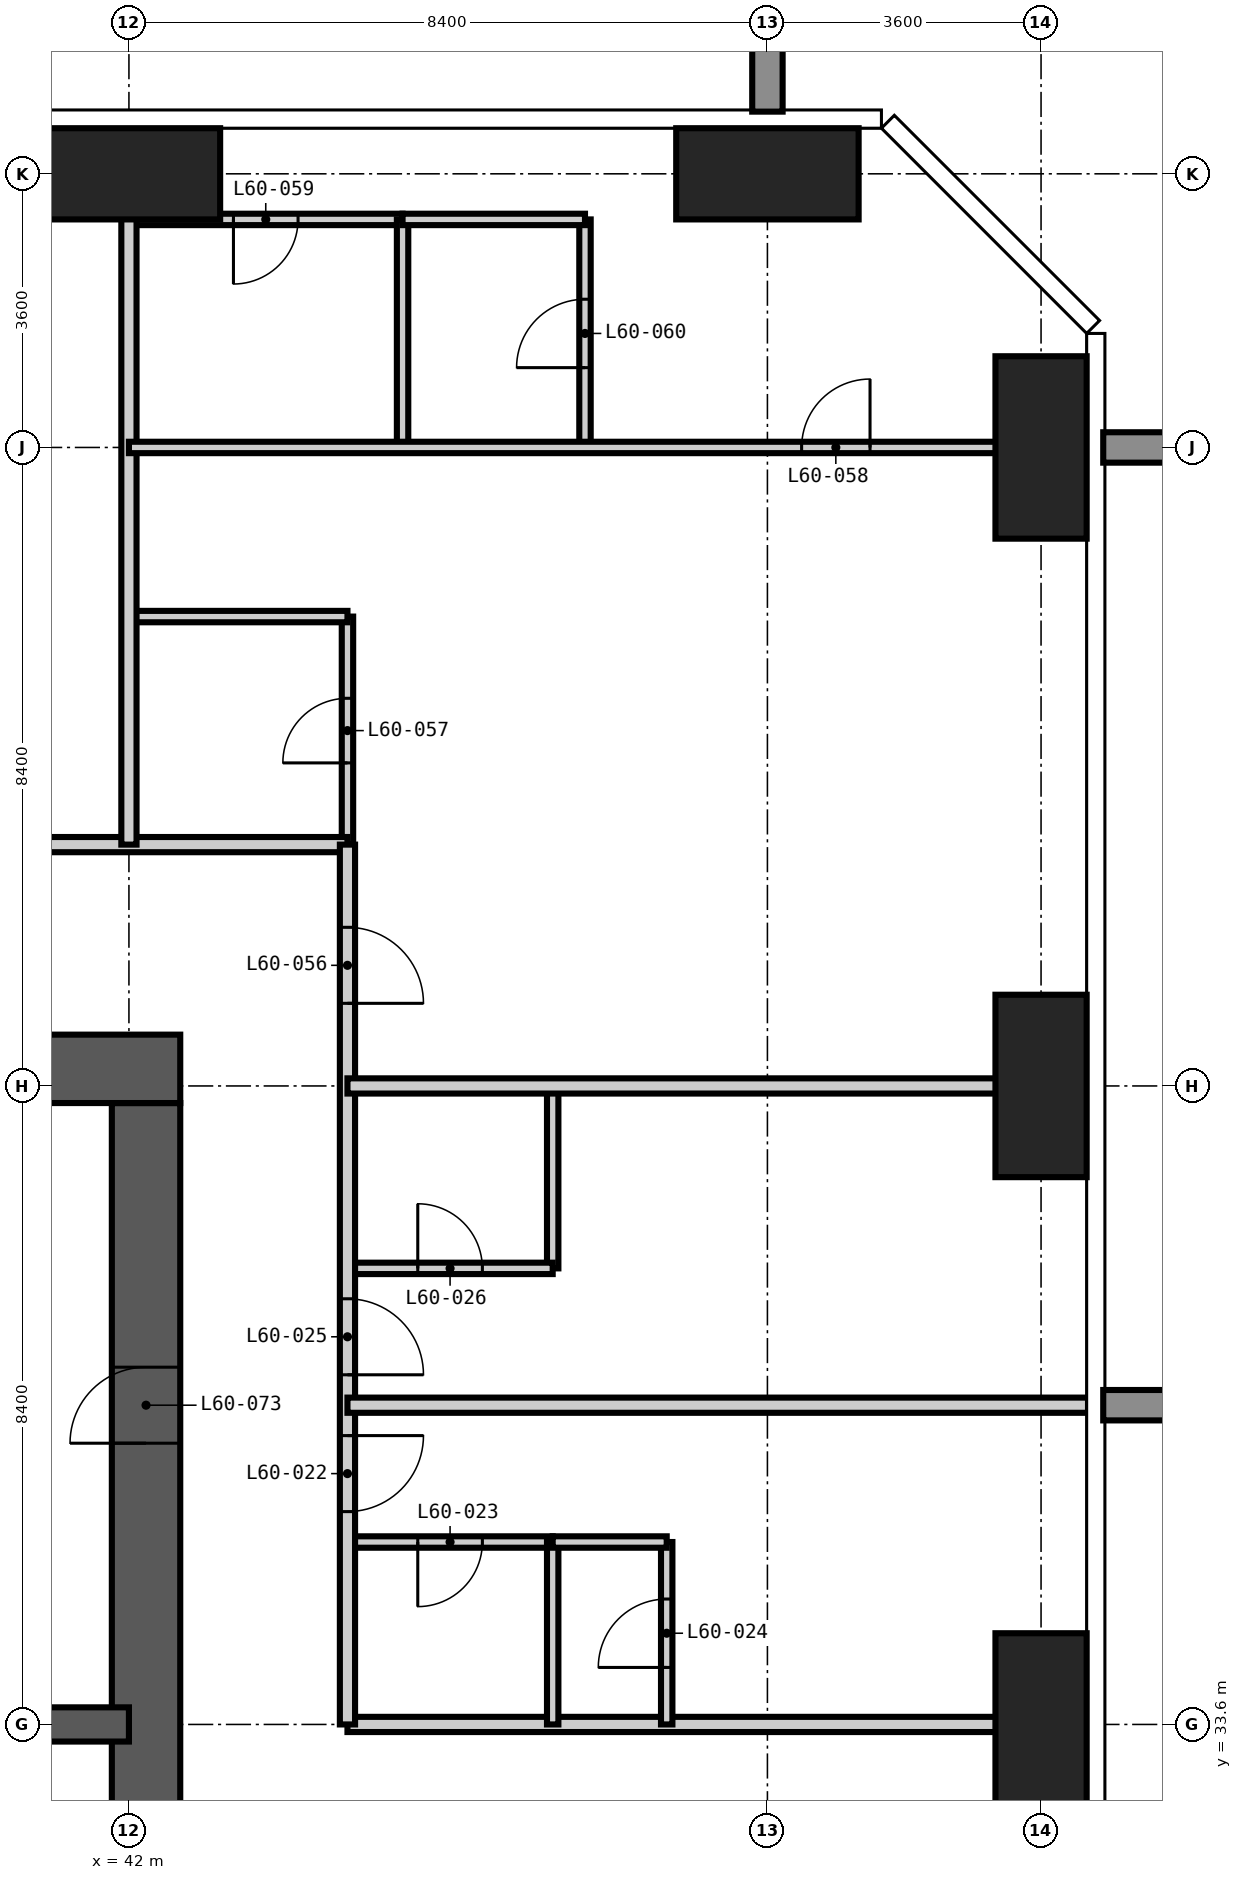
"""IFC4 building model, lengths in metres.
Left out: names, types, materials, properties, quantities, classifications, styles, units other than length and angle.
Written with IfcOpenShell. Run it as: python <this file> out.ifc"""

import sys

from ifc_helpers import new_model, si_unit, direction, frame, frame_2d, origin, origin_2d, place, context, subcontext, project, spatial, rectangle, extrude, element, fill, save


model = new_model("IFC4")
c1 = context("Model", 3, precision=1e-05, world=origin(), true_north=direction((0.0, 1.0)))
c2 = subcontext(c1, "Body", "Model", "MODEL_VIEW")
j1 = project(units=[si_unit("LENGTHUNIT", "METRE"), si_unit("PLANEANGLEUNIT", "RADIAN")], contexts=[c1])
p1 = place(None, origin())
s1 = spatial("IfcSite", under=j1, at=p1, CompositionType="ELEMENT")
p2 = place(p1, origin())
s2 = spatial("IfcBuilding", under=s1, at=p2, CompositionType="ELEMENT")
p3 = place(p2, frame((0.0, 0.0, 233.4)))
s3 = spatial("IfcBuildingStorey", under=s2, at=p3, CompositionType="ELEMENT", Elevation=233.4)
for number, where, z_axis, x_axis in (
    (1, (42.0, 54.0, -0.35), (0.0, 0.0, 1.0), (1.0, 0.0, 0.0)),
    (2, (50.4, 54.0, -0.35), (0.0, 0.0, 1.0), (1.0, 0.0, 0.0)),
):
    element("IfcColumn", number, at=place(p3, frame(where, z_axis=z_axis, x_axis=x_axis)), inside=s3, PredefinedType="COLUMN", context=c2, shape_type="SweptSolid", body=[
        extrude(rectangle(XDim=2.4, YDim=1.2, at=origin_2d()), origin(), (0.0, 0.0, 1.0), 3.9),
    ])
for number, where, z_axis, x_axis in (
    (3, (54.0, 33.6, -0.35), (0.0, 0.0, 1.0), (1.0, 0.0, 0.0)),
    (4, (54.0, 42.0, -0.35), (0.0, 0.0, 1.0), (1.0, 0.0, 0.0)),
    (5, (54.0, 50.4, -0.35), (0.0, 0.0, 1.0), (1.0, 0.0, 0.0)),
):
    element("IfcColumn", number, at=place(p3, frame(where, z_axis=z_axis, x_axis=x_axis)), inside=s3, PredefinedType="COLUMN", context=c2, shape_type="SweptSolid", body=[
        extrude(rectangle(XDim=1.2, YDim=2.4, at=origin_2d()), origin(), (0.0, 0.0, 1.0), 3.9),
    ])
p4 = place(p3, frame((42.225, 17.025, -0.35), z_axis=(0.0, 0.0, 1.0), x_axis=(0.0, 1.0, 0.0)))
e6 = element("IfcWall", 6, at=p4, inside=s3, PredefinedType="SHEAR", context=c2, shape_type="SweptSolid", body=[
    extrude(rectangle(XDim=24.75, YDim=0.9, at=frame_2d((12.375, 0.0))), origin(), (0.0, 0.0, 1.0), 3.9),
])
p5 = place(p4, frame((0.575, 0.0, 0.35)))
e7 = element("IfcOpeningElement", 7, at=p5, cuts=e6, PredefinedType="OPENING", context=c2, shape_type="SweptSolid", body=[
    extrude(rectangle(XDim=1.2, YDim=2.2, at=frame_2d((0.6, 1.1))), frame((0.0, 0.46, 0.0), z_axis=(0.0, -1.0, 0.0), x_axis=(1.0, 0.0, 0.0)), (0.0, 0.0, 1.0), 0.92),
])
p6 = place(p4, frame((11.475, 0.0, 0.35)))
e8 = element("IfcOpeningElement", 8, at=p6, cuts=e6, PredefinedType="OPENING", context=c2, shape_type="SweptSolid", body=[
    extrude(rectangle(XDim=1.8, YDim=2.2, at=frame_2d((0.9, 1.1))), frame((0.0, 0.46, 0.0), z_axis=(0.0, -1.0, 0.0), x_axis=(1.0, 0.0, 0.0)), (0.0, 0.0, 1.0), 0.92),
])
p7 = place(p4, frame((20.275, 0.0, 0.35)))
e9 = element("IfcOpeningElement", 9, at=p7, cuts=e6, PredefinedType="OPENING", context=c2, shape_type="SweptSolid", body=[
    extrude(rectangle(XDim=1.0, YDim=2.1, at=frame_2d((0.5, 1.05))), frame((0.0, 0.46, 0.0), z_axis=(0.0, -1.0, 0.0), x_axis=(1.0, 0.0, 0.0)), (0.0, 0.0, 1.0), 0.92),
])
p8 = place(p3, frame((42.675, 42.225, -0.35), z_axis=(0.0, 0.0, 1.0), x_axis=(-1.0, 0.0, 0.0)))
e10 = element("IfcWall", 10, at=p8, inside=s3, PredefinedType="SHEAR", context=c2, shape_type="SweptSolid", body=[
    extrude(rectangle(XDim=18.15, YDim=0.9, at=frame_2d((9.075, 0.0))), origin(), (0.0, 0.0, 1.0), 3.9),
])
p9 = place(p8, frame((10.575, 0.0, 0.35)))
e11 = element("IfcOpeningElement", 11, at=p9, cuts=e10, PredefinedType="OPENING", context=c2, shape_type="SweptSolid", body=[
    extrude(rectangle(XDim=1.2, YDim=2.2, at=frame_2d((0.6, 1.1))), frame((0.0, 0.46, 0.0), z_axis=(0.0, -1.0, 0.0), x_axis=(1.0, 0.0, 0.0)), (0.0, 0.0, 1.0), 0.92),
])
p10 = place(p3, frame((25.2, 33.6, -0.35), z_axis=(0.0, 0.0, 1.0), x_axis=(1.0, 0.0, 0.0)))
e12 = element("IfcWall", 12, at=p10, inside=s3, PredefinedType="SHEAR", context=c2, shape_type="SweptSolid", body=[
    extrude(rectangle(XDim=16.8, YDim=0.45, at=frame_2d((8.4, 0.0))), origin(), (0.0, 0.0, 1.0), 3.9),
])
p11 = place(p3, frame((44.875, 45.175, 0.0), z_axis=(0.0, 0.0, 1.0), x_axis=(0.0, 1.0, 0.0)))
e13 = element("IfcWall", 13, at=p11, inside=s3, PredefinedType="PARTITIONING", context=c2, shape_type="SweptSolid", body=[
    extrude(rectangle(XDim=3.0, YDim=0.15, at=frame_2d((1.5, 0.0))), origin(), (0.0, 0.0, 1.0), 3.55),
])
p12 = place(p11, frame((1.075, 0.0, 0.0)))
e14 = element("IfcOpeningElement", 14, at=p12, cuts=e13, PredefinedType="OPENING", context=c2, shape_type="SweptSolid", body=[
    extrude(rectangle(XDim=0.85, YDim=2.1, at=frame_2d((0.425, 1.05))), frame((0.0, 0.085, 0.0), z_axis=(0.0, -1.0, 0.0), x_axis=(1.0, 0.0, 0.0)), (0.0, 0.0, 1.0), 0.17),
])
p13 = place(p3, frame((47.575, 39.6, 0.0), z_axis=(0.0, 0.0, 1.0), x_axis=(0.0, 1.0, 0.0)))
e15 = element("IfcWall", 15, at=p13, inside=s3, PredefinedType="PARTITIONING", context=c2, shape_type="SweptSolid", body=[
    extrude(rectangle(XDim=2.4, YDim=0.15, at=frame_2d((1.2, 0.0))), origin(), (0.0, 0.0, 1.0), 3.55),
])
p14 = place(p3, frame((44.875, 36.0, 0.0), z_axis=(0.0, 0.0, 1.0), x_axis=(1.0, 0.0, 0.0)))
e16 = element("IfcWall", 16, at=p14, inside=s3, PredefinedType="PARTITIONING", context=c2, shape_type="SweptSolid", body=[
    extrude(rectangle(XDim=2.7, YDim=0.15, at=frame_2d((1.35, 0.0))), origin(), (0.0, 0.0, 1.0), 3.55),
])
p15 = place(p14, frame((0.925, 0.0, 0.0)))
e17 = element("IfcOpeningElement", 17, at=p15, cuts=e16, PredefinedType="OPENING", context=c2, shape_type="SweptSolid", body=[
    extrude(rectangle(XDim=0.85, YDim=2.1, at=frame_2d((0.425, 1.05))), frame((0.0, 0.085, 0.0), z_axis=(0.0, -1.0, 0.0), x_axis=(1.0, 0.0, 0.0)), (0.0, 0.0, 1.0), 0.17),
])
p16 = place(p3, frame((44.875, 39.6, 0.0), z_axis=(0.0, 0.0, 1.0), x_axis=(1.0, 0.0, 0.0)))
e18 = element("IfcWall", 18, at=p16, inside=s3, PredefinedType="PARTITIONING", context=c2, shape_type="SweptSolid", body=[
    extrude(rectangle(XDim=2.7, YDim=0.15, at=frame_2d((1.35, 0.0))), origin(), (0.0, 0.0, 1.0), 3.55),
])
p17 = place(p16, frame((0.925, 0.0, 0.0)))
e19 = element("IfcOpeningElement", 19, at=p17, cuts=e18, PredefinedType="OPENING", context=c2, shape_type="SweptSolid", body=[
    extrude(rectangle(XDim=0.85, YDim=2.1, at=frame_2d((0.425, 1.05))), frame((0.0, 0.085, 0.0), z_axis=(0.0, -1.0, 0.0), x_axis=(1.0, 0.0, 0.0)), (0.0, 0.0, 1.0), 0.17),
])
p18 = place(p3, frame((42.0, 48.175, 0.0), z_axis=(0.0, 0.0, 1.0), x_axis=(1.0, 0.0, 0.0)))
e20 = element("IfcWall", 20, at=p18, inside=s3, PredefinedType="PARTITIONING", context=c2, shape_type="SweptSolid", body=[
    extrude(rectangle(XDim=2.875, YDim=0.15, at=frame_2d((1.438, 0.0))), origin(), (0.0, 0.0, 1.0), 3.55),
])
p19 = place(p3, frame((42.0, 53.4, 0.0), z_axis=(0.0, 0.0, 1.0), x_axis=(1.0, 0.0, 0.0)))
e21 = element("IfcWall", 21, at=p19, inside=s3, PredefinedType="PARTITIONING", context=c2, shape_type="SweptSolid", body=[
    extrude(rectangle(XDim=3.6, YDim=0.15, at=frame_2d((1.8, 0.0))), origin(), (0.0, 0.0, 1.0), 3.55),
])
p20 = place(p19, frame((1.375, 0.0, 0.0)))
e22 = element("IfcOpeningElement", 22, at=p20, cuts=e21, PredefinedType="OPENING", context=c2, shape_type="SweptSolid", body=[
    extrude(rectangle(XDim=0.85, YDim=2.1, at=frame_2d((0.425, 1.05))), frame((0.0, 0.085, 0.0), z_axis=(0.0, -1.0, 0.0), x_axis=(1.0, 0.0, 0.0)), (0.0, 0.0, 1.0), 0.17),
])
p21 = place(p3, frame((44.875, 33.6, 0.0), z_axis=(0.0, 0.0, 1.0), x_axis=(1.0, 0.0, 0.0)))
e23 = element("IfcWall", 23, at=p21, inside=s3, PredefinedType="PARTITIONING", context=c2, shape_type="SweptSolid", body=[
    extrude(rectangle(XDim=9.743, YDim=0.2, at=frame_2d((4.872, 0.0))), origin(), (0.0, 0.0, 1.0), 3.55),
])
p22 = place(p3, frame((22.625, 45.175, 0.0), z_axis=(0.0, 0.0, 1.0), x_axis=(1.0, 0.0, 0.0)))
e24 = element("IfcWall", 24, at=p22, inside=s3, PredefinedType="PARTITIONING", context=c2, shape_type="SweptSolid", body=[
    extrude(rectangle(XDim=22.25, YDim=0.2, at=frame_2d((11.125, 0.0))), origin(), (0.0, 0.0, 1.0), 3.55),
])
p23 = place(p22, frame((7.625, 0.0, 0.0)))
e25 = element("IfcOpeningElement", 25, at=p23, cuts=e24, PredefinedType="OPENING", context=c2, shape_type="SweptSolid", body=[
    extrude(rectangle(XDim=1.0, YDim=2.2, at=frame_2d((0.5, 1.1))), frame((0.0, 0.11, 0.0), z_axis=(0.0, -1.0, 0.0), x_axis=(1.0, 0.0, 0.0)), (0.0, 0.0, 1.0), 0.22),
])
p24 = place(p22, frame((16.025, 0.0, 0.0)))
e26 = element("IfcOpeningElement", 26, at=p24, cuts=e24, PredefinedType="OPENING", context=c2, shape_type="SweptSolid", body=[
    extrude(rectangle(XDim=1.0, YDim=2.2, at=frame_2d((0.5, 1.1))), frame((0.0, 0.11, 0.0), z_axis=(0.0, -1.0, 0.0), x_axis=(1.0, 0.0, 0.0)), (0.0, 0.0, 1.0), 0.22),
])
p25 = place(p3, frame((44.875, 45.175, 0.0), z_axis=(0.0, 0.0, 1.0), x_axis=(0.0, -1.0, 0.0)))
e27 = element("IfcWall", 27, at=p25, inside=s3, PredefinedType="PARTITIONING", context=c2, shape_type="SweptSolid", body=[
    extrude(rectangle(XDim=11.575, YDim=0.2, at=frame_2d((5.788, 0.0))), origin(), (0.0, 0.0, 1.0), 3.55),
])
p26 = place(p25, frame((7.775, 0.0, 0.0)))
e28 = element("IfcOpeningElement", 28, at=p26, cuts=e27, PredefinedType="OPENING", context=c2, shape_type="SweptSolid", body=[
    extrude(rectangle(XDim=1.0, YDim=2.2, at=frame_2d((0.5, 1.1))), frame((0.0, 0.11, 0.0), z_axis=(0.0, -1.0, 0.0), x_axis=(1.0, 0.0, 0.0)), (0.0, 0.0, 1.0), 0.22),
])
p27 = place(p25, frame((5.975, 0.0, 0.0)))
e29 = element("IfcOpeningElement", 29, at=p27, cuts=e27, PredefinedType="OPENING", context=c2, shape_type="SweptSolid", body=[
    extrude(rectangle(XDim=1.0, YDim=2.2, at=frame_2d((0.5, 1.1))), frame((0.0, 0.11, 0.0), z_axis=(0.0, -1.0, 0.0), x_axis=(1.0, 0.0, 0.0)), (0.0, 0.0, 1.0), 0.22),
])
p28 = place(p25, frame((1.088, 0.0, 0.0)))
e30 = element("IfcOpeningElement", 30, at=p28, cuts=e27, PredefinedType="OPENING", context=c2, shape_type="SweptSolid", body=[
    extrude(rectangle(XDim=1.0, YDim=2.2, at=frame_2d((0.5, 1.1))), frame((0.0, 0.11, 0.0), z_axis=(0.0, -1.0, 0.0), x_axis=(1.0, 0.0, 0.0)), (0.0, 0.0, 1.0), 0.22),
])
p29 = place(p3, frame((42.0, 45.175, 0.0), z_axis=(0.0, 0.0, 1.0), x_axis=(0.0, 1.0, 0.0)))
e31 = element("IfcWall", 31, at=p29, inside=s3, PredefinedType="PARTITIONING", context=c2, shape_type="SweptSolid", body=[
    extrude(rectangle(XDim=9.443, YDim=0.2, at=frame_2d((4.721, 0.0))), origin(), (0.0, 0.0, 1.0), 3.55),
])
for number, where, z_axis, x_axis in (
    (32, (44.875, 37.8, 0.0), (0.0, 0.0, 1.0), (1.0, 0.0, 0.0)),
    (33, (44.875, 42.0, 0.0), (0.0, 0.0, 1.0), (1.0, 0.0, 0.0)),
):
    element("IfcWall", number, at=place(p3, frame(where, z_axis=z_axis, x_axis=x_axis)), inside=s3, PredefinedType="PARTITIONING", context=c2, shape_type="SweptSolid", body=[
        extrude(rectangle(XDim=9.743, YDim=0.2, at=frame_2d((4.872, 0.0))), origin(), (0.0, 0.0, 1.0), 3.55),
    ])
p30 = place(p3, frame((45.6, 50.4, 0.0), z_axis=(0.0, 0.0, 1.0), x_axis=(0.0, 1.0, 0.0)))
e34 = element("IfcWall", 34, at=p30, inside=s3, PredefinedType="PARTITIONING", context=c2, shape_type="SweptSolid", body=[
    extrude(rectangle(XDim=3.0, YDim=0.15, at=frame_2d((1.5, 0.0))), origin(), (0.0, 0.0, 1.0), 3.55),
])
p31 = place(p3, frame((47.575, 33.6, 0.0), z_axis=(0.0, 0.0, 1.0), x_axis=(0.0, 1.0, 0.0)))
e35 = element("IfcWall", 35, at=p31, inside=s3, PredefinedType="PARTITIONING", context=c2, shape_type="SweptSolid", body=[
    extrude(rectangle(XDim=2.4, YDim=0.15, at=frame_2d((1.2, 0.0))), origin(), (0.0, 0.0, 1.0), 3.55),
])
p32 = place(p3, frame((48.0, 50.4, 0.0), z_axis=(0.0, 0.0, 1.0), x_axis=(0.0, 1.0, 0.0)))
e36 = element("IfcWall", 36, at=p32, inside=s3, PredefinedType="PARTITIONING", context=c2, shape_type="SweptSolid", body=[
    extrude(rectangle(XDim=3.0, YDim=0.15, at=frame_2d((1.5, 0.0))), origin(), (0.0, 0.0, 1.0), 3.55),
])
p33 = place(p32, frame((1.05, 0.0, 0.0)))
e37 = element("IfcOpeningElement", 37, at=p33, cuts=e36, PredefinedType="OPENING", context=c2, shape_type="SweptSolid", body=[
    extrude(rectangle(XDim=0.9, YDim=2.1, at=frame_2d((0.45, 1.05))), frame((0.0, 0.085, 0.0), z_axis=(0.0, -1.0, 0.0), x_axis=(1.0, 0.0, 0.0)), (0.0, 0.0, 1.0), 0.17),
])
p34 = place(p3, frame((49.075, 33.6, 0.0), z_axis=(0.0, 0.0, 1.0), x_axis=(0.0, 1.0, 0.0)))
e38 = element("IfcWall", 38, at=p34, inside=s3, PredefinedType="PARTITIONING", context=c2, shape_type="SweptSolid", body=[
    extrude(rectangle(XDim=2.4, YDim=0.15, at=frame_2d((1.2, 0.0))), origin(), (0.0, 0.0, 1.0), 3.55),
])
p35 = place(p34, frame((0.75, 0.0, 0.0)))
e39 = element("IfcOpeningElement", 39, at=p35, cuts=e38, PredefinedType="OPENING", context=c2, shape_type="SweptSolid", body=[
    extrude(rectangle(XDim=0.9, YDim=2.1, at=frame_2d((0.45, 1.05))), frame((0.0, 0.085, 0.0), z_axis=(0.0, -1.0, 0.0), x_axis=(1.0, 0.0, 0.0)), (0.0, 0.0, 1.0), 0.17),
])
p36 = place(p3, frame((47.575, 36.0, 0.0), z_axis=(0.0, 0.0, 1.0), x_axis=(1.0, 0.0, 0.0)))
e40 = element("IfcWall", 40, at=p36, inside=s3, PredefinedType="PARTITIONING", context=c2, shape_type="SweptSolid", body=[
    extrude(rectangle(XDim=1.5, YDim=0.15, at=frame_2d((0.75, 0.0))), origin(), (0.0, 0.0, 1.0), 3.55),
])
p37 = place(p3, frame((42.0, 50.4, 0.0), z_axis=(0.0, 0.0, 1.0), x_axis=(1.0, 0.0, 0.0)))
e41 = element("IfcWall", 41, at=p37, inside=s3, PredefinedType="PARTITIONING", context=c2, shape_type="SweptSolid", body=[
    extrude(rectangle(XDim=12.618, YDim=0.15, at=frame_2d((6.309, 0.0))), origin(), (0.0, 0.0, 1.0), 3.55),
])
p38 = place(p37, frame((8.85, 0.0, 0.0)))
e42 = element("IfcOpeningElement", 42, at=p38, cuts=e41, PredefinedType="OPENING", context=c2, shape_type="SweptSolid", body=[
    extrude(rectangle(XDim=0.9, YDim=2.1, at=frame_2d((0.45, 1.05))), frame((0.0, 0.085, 0.0), z_axis=(0.0, -1.0, 0.0), x_axis=(1.0, 0.0, 0.0)), (0.0, 0.0, 1.0), 0.17),
])
p39 = place(p3, frame((45.6, 53.4, 0.0), z_axis=(0.0, 0.0, 1.0), x_axis=(1.0, 0.0, 0.0)))
e43 = element("IfcWall", 43, at=p39, inside=s3, PredefinedType="PARTITIONING", context=c2, shape_type="SweptSolid", body=[
    extrude(rectangle(XDim=2.4, YDim=0.15, at=frame_2d((1.2, 0.0))), origin(), (0.0, 0.0, 1.0), 3.55),
])
p40 = place(p26, origin())
e44 = element("IfcDoor", 44, at=p40, inside=s3, OperationType="SINGLE_SWING_LEFT", PredefinedType="DOOR", context=c2, shape_type="SweptSolid", body=[
    extrude(rectangle(XDim=1.0, YDim=2.2, at=frame_2d((0.5, 1.1))), frame((0.0, 0.025, 0.0), z_axis=(0.0, -1.0, 0.0), x_axis=(1.0, 0.0, 0.0)), (0.0, 0.0, 1.0), 0.05),
])
fill(e28, e44)
p41 = place(p15, frame((0.85, 0.0, 0.0), z_axis=(0.0, 0.0, 1.0), x_axis=(-1.0, 0.0, 0.0)))
e45 = element("IfcDoor", 45, at=p41, inside=s3, OperationType="SINGLE_SWING_RIGHT", PredefinedType="DOOR", context=c2, shape_type="SweptSolid", body=[
    extrude(rectangle(XDim=0.85, YDim=2.1, at=frame_2d((0.425, 1.05))), frame((0.0, 0.025, 0.0), z_axis=(0.0, -1.0, 0.0), x_axis=(1.0, 0.0, 0.0)), (0.0, 0.0, 1.0), 0.05),
])
fill(e17, e45)
p42 = place(p35, origin())
e46 = element("IfcDoor", 46, at=p42, inside=s3, OperationType="SINGLE_SWING_LEFT", PredefinedType="DOOR", context=c2, shape_type="SweptSolid", body=[
    extrude(rectangle(XDim=0.9, YDim=2.1, at=frame_2d((0.45, 1.05))), frame((0.0, 0.025, 0.0), z_axis=(0.0, -1.0, 0.0), x_axis=(1.0, 0.0, 0.0)), (0.0, 0.0, 1.0), 0.05),
])
fill(e39, e46)
p43 = place(p27, origin())
e47 = element("IfcDoor", 47, at=p43, inside=s3, OperationType="SINGLE_SWING_RIGHT", PredefinedType="DOOR", context=c2, shape_type="SweptSolid", body=[
    extrude(rectangle(XDim=1.0, YDim=2.2, at=frame_2d((0.5, 1.1))), frame((0.0, 0.025, 0.0), z_axis=(0.0, -1.0, 0.0), x_axis=(1.0, 0.0, 0.0)), (0.0, 0.0, 1.0), 0.05),
])
fill(e29, e47)
p44 = place(p17, origin())
e48 = element("IfcDoor", 48, at=p44, inside=s3, OperationType="SINGLE_SWING_LEFT", PredefinedType="DOOR", context=c2, shape_type="SweptSolid", body=[
    extrude(rectangle(XDim=0.85, YDim=2.1, at=frame_2d((0.425, 1.05))), frame((0.0, 0.025, 0.0), z_axis=(0.0, -1.0, 0.0), x_axis=(1.0, 0.0, 0.0)), (0.0, 0.0, 1.0), 0.05),
])
fill(e19, e48)
p45 = place(p28, origin())
e49 = element("IfcDoor", 49, at=p45, inside=s3, OperationType="SINGLE_SWING_RIGHT", PredefinedType="DOOR", context=c2, shape_type="SweptSolid", body=[
    extrude(rectangle(XDim=1.0, YDim=2.2, at=frame_2d((0.5, 1.1))), frame((0.0, 0.025, 0.0), z_axis=(0.0, -1.0, 0.0), x_axis=(1.0, 0.0, 0.0)), (0.0, 0.0, 1.0), 0.05),
])
fill(e30, e49)
p46 = place(p12, origin())
e50 = element("IfcDoor", 50, at=p46, inside=s3, OperationType="SINGLE_SWING_LEFT", PredefinedType="DOOR", context=c2, shape_type="SweptSolid", body=[
    extrude(rectangle(XDim=0.85, YDim=2.1, at=frame_2d((0.425, 1.05))), frame((0.0, 0.025, 0.0), z_axis=(0.0, -1.0, 0.0), x_axis=(1.0, 0.0, 0.0)), (0.0, 0.0, 1.0), 0.05),
])
fill(e14, e50)
p47 = place(p38, origin())
e51 = element("IfcDoor", 51, at=p47, inside=s3, OperationType="SINGLE_SWING_RIGHT", PredefinedType="DOOR", context=c2, shape_type="SweptSolid", body=[
    extrude(rectangle(XDim=0.9, YDim=2.1, at=frame_2d((0.45, 1.05))), frame((0.0, 0.025, 0.0), z_axis=(0.0, -1.0, 0.0), x_axis=(1.0, 0.0, 0.0)), (0.0, 0.0, 1.0), 0.05),
])
fill(e42, e51)
p48 = place(p20, frame((0.85, 0.0, 0.0), z_axis=(0.0, 0.0, 1.0), x_axis=(-1.0, 0.0, 0.0)))
e52 = element("IfcDoor", 52, at=p48, inside=s3, OperationType="SINGLE_SWING_RIGHT", PredefinedType="DOOR", context=c2, shape_type="SweptSolid", body=[
    extrude(rectangle(XDim=0.85, YDim=2.1, at=frame_2d((0.425, 1.05))), frame((0.0, 0.025, 0.0), z_axis=(0.0, -1.0, 0.0), x_axis=(1.0, 0.0, 0.0)), (0.0, 0.0, 1.0), 0.05),
])
fill(e22, e52)
p49 = place(p33, origin())
e53 = element("IfcDoor", 53, at=p49, inside=s3, OperationType="SINGLE_SWING_LEFT", PredefinedType="DOOR", context=c2, shape_type="SweptSolid", body=[
    extrude(rectangle(XDim=0.9, YDim=2.1, at=frame_2d((0.45, 1.05))), frame((0.0, 0.025, 0.0), z_axis=(0.0, -1.0, 0.0), x_axis=(1.0, 0.0, 0.0)), (0.0, 0.0, 1.0), 0.05),
])
fill(e37, e53)
p50 = place(p7, origin())
e54 = element("IfcDoor", 54, at=p50, inside=s3, OperationType="SINGLE_SWING_LEFT", PredefinedType="DOOR", context=c2, shape_type="SweptSolid", body=[
    extrude(rectangle(XDim=1.0, YDim=2.1, at=frame_2d((0.5, 1.05))), frame((0.0, 0.025, 0.0), z_axis=(0.0, -1.0, 0.0), x_axis=(1.0, 0.0, 0.0)), (0.0, 0.0, 1.0), 0.05),
])
fill(e9, e54)
save(model, sys.argv[1])
